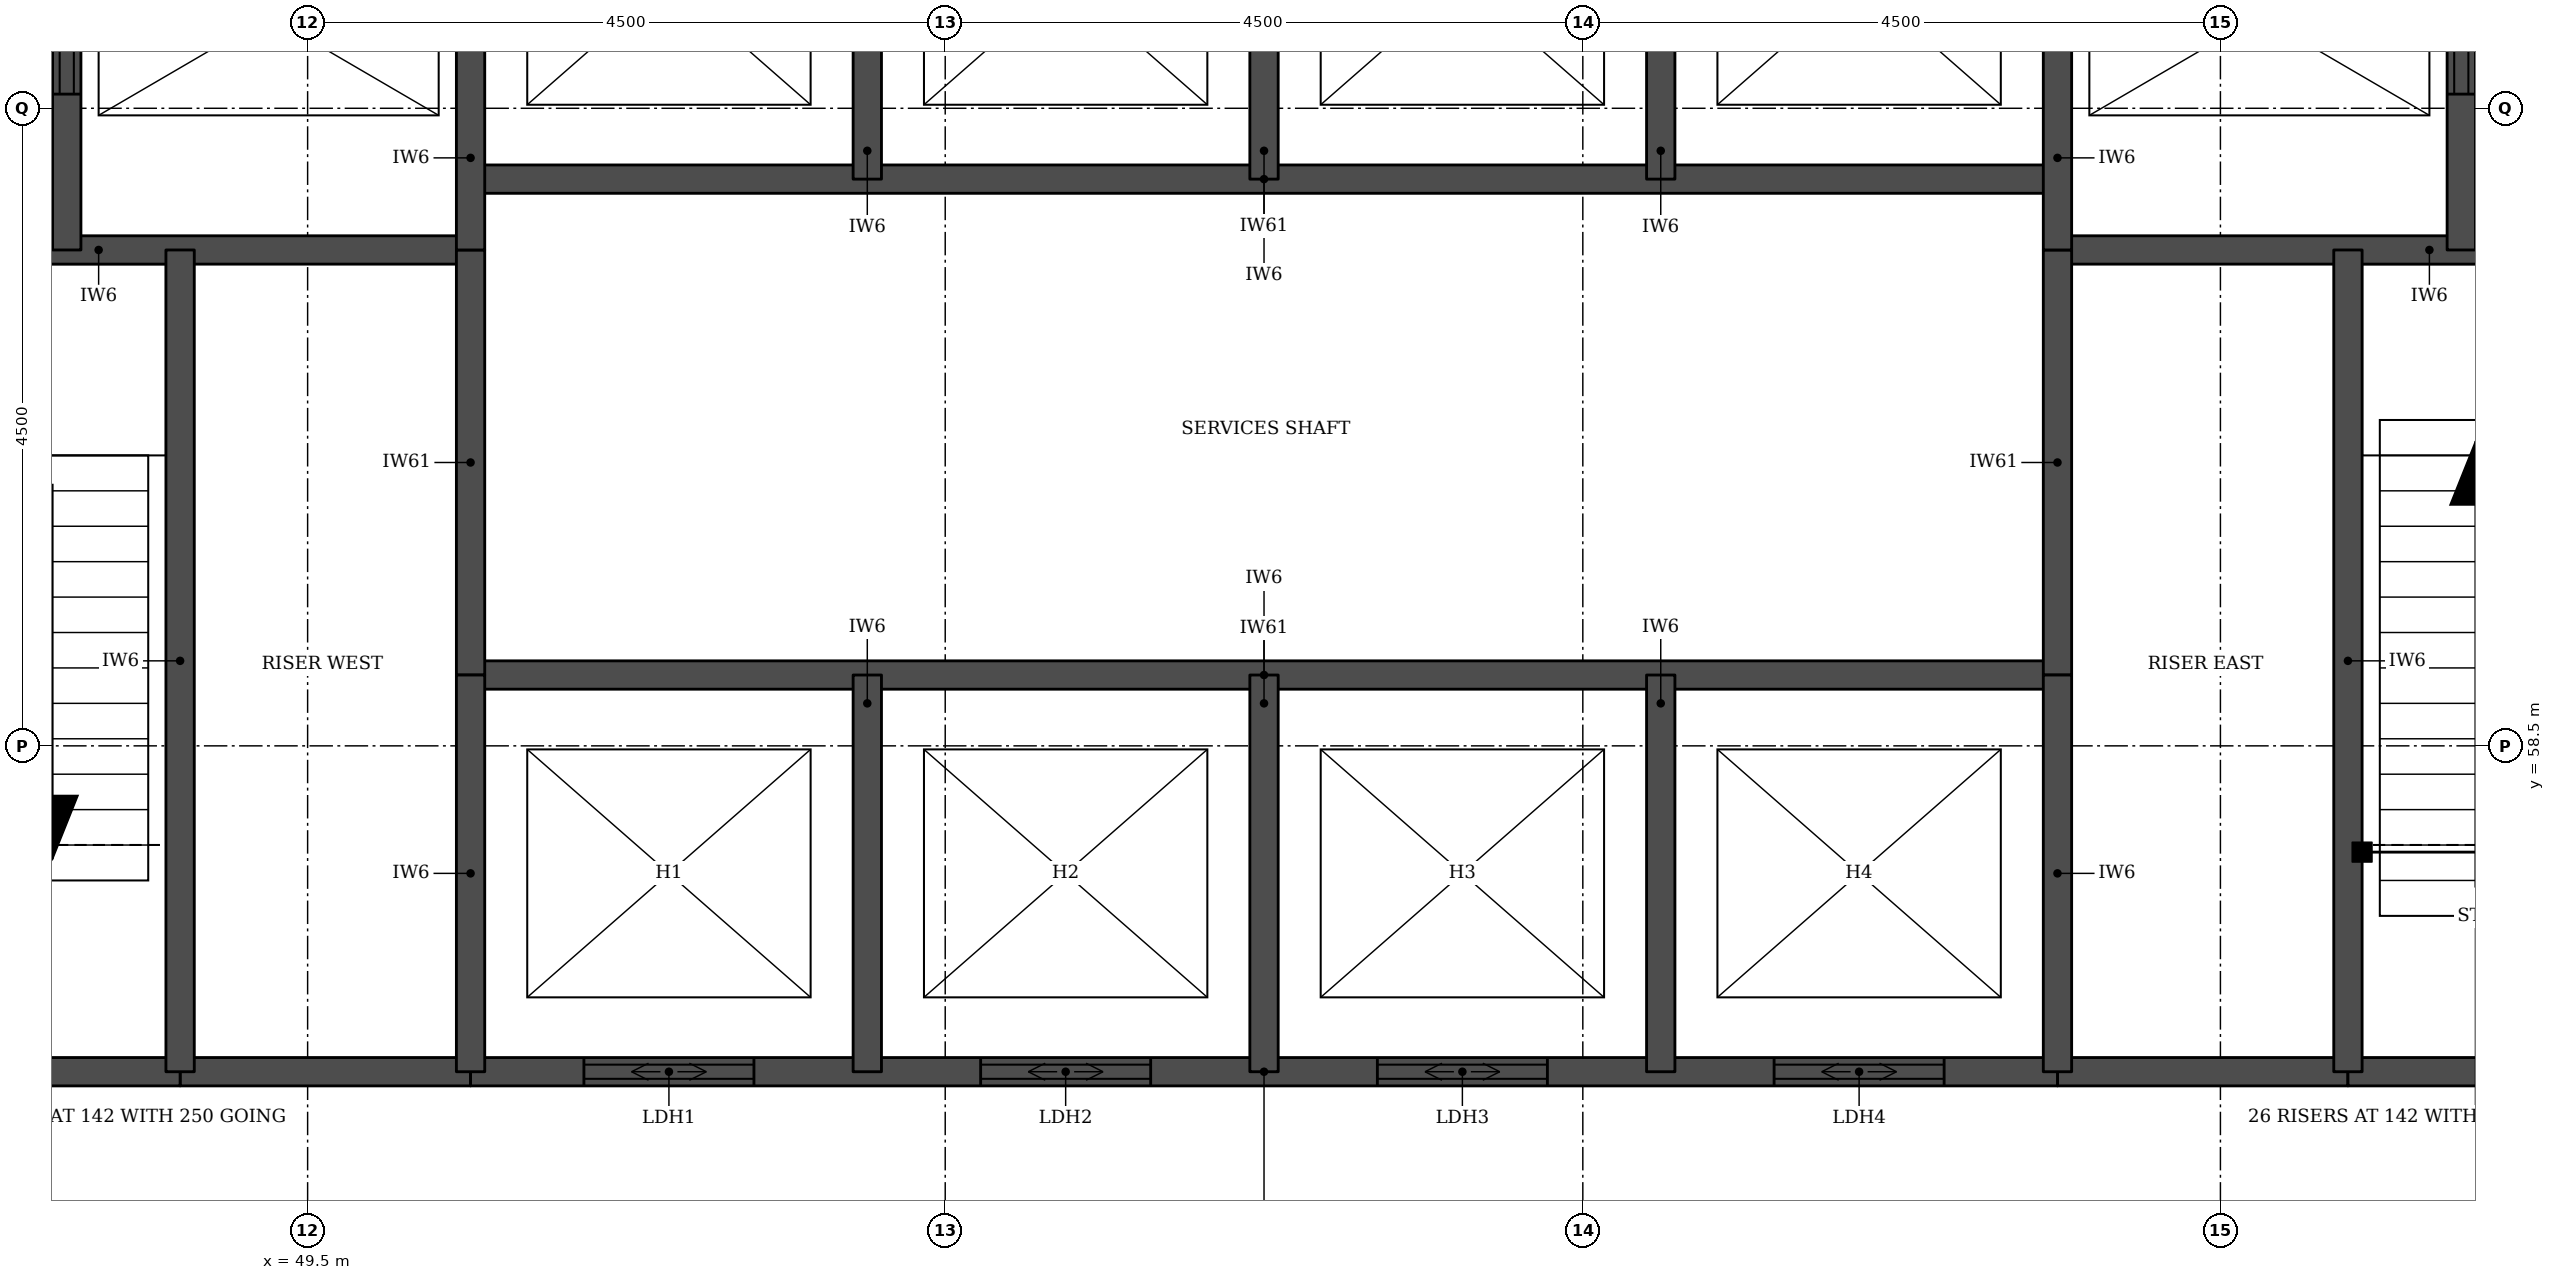
"""IFC4 building model, lengths in metres.
Left out: names, types, materials, properties, quantities, classifications, styles, units other than length and angle.
Written with IfcOpenShell. Run it as: python <this file> out.ifc"""

import sys

from ifc_helpers import new_model, si_unit, direction, frame, frame_2d, origin, place, context, subcontext, project, spatial, rectangle, extrude, element, fill, save


model = new_model("IFC4")
c1 = context("Model", 3, precision=1e-05, world=origin(), true_north=direction((0.0, 1.0)))
c2 = subcontext(c1, "Body", "Model", "MODEL_VIEW")
j1 = project(units=[si_unit("LENGTHUNIT", "METRE"), si_unit("PLANEANGLEUNIT", "RADIAN")], contexts=[c1])
p1 = place(None, origin())
s1 = spatial("IfcSite", under=j1, at=p1, CompositionType="ELEMENT")
p2 = place(p1, origin())
s2 = spatial("IfcBuilding", under=s1, at=p2, CompositionType="ELEMENT")
p3 = place(p2, frame((0.0, 0.0, 166.2)))
s3 = spatial("IfcBuildingStorey", under=s2, at=p3, CompositionType="ELEMENT", Elevation=166.2)
for number, where, z_axis, x_axis in (
    (1, (48.6, 56.2, 0.0), (0.0, 0.0, 1.0), (1.0, 0.0, 0.0)),
    (2, (61.85, 56.2, 0.0), (0.0, 0.0, 1.0), (1.0, 0.0, 0.0)),
):
    element("IfcWall", number, at=place(p3, frame(where, z_axis=z_axis, x_axis=x_axis)), inside=s3, PredefinedType="SOLIDWALL", context=c2, shape_type="SweptSolid", body=[
        extrude(rectangle(XDim=2.05, YDim=0.2, at=frame_2d((1.025, 0.0))), origin(), (0.0, 0.0, 1.0), 3.55),
    ])
p4 = place(p3, frame((45.4, 56.2, 0.0), z_axis=(0.0, 0.0, 1.0), x_axis=(1.0, 0.0, 0.0)))
e3 = element("IfcWall", 3, at=p4, inside=s3, PredefinedType="SOLIDWALL", context=c2, shape_type="SweptSolid", body=[
    extrude(rectangle(XDim=3.2, YDim=0.2, at=frame_2d((1.6, 0.0))), origin(), (0.0, 0.0, 1.0), 3.55),
])
p5 = place(p3, frame((50.65, 56.2, 0.0), z_axis=(0.0, 0.0, 1.0), x_axis=(1.0, 0.0, 0.0)))
e4 = element("IfcWall", 4, at=p5, inside=s3, PredefinedType="SOLIDWALL", context=c2, shape_type="SweptSolid", body=[
    extrude(rectangle(XDim=11.2, YDim=0.2, at=frame_2d((5.6, 0.0))), origin(), (0.0, 0.0, 1.0), 3.55),
])
p6 = place(p5, frame((0.8, 0.0, 0.0)))
e5 = element("IfcOpeningElement", 5, at=p6, cuts=e4, PredefinedType="OPENING", context=c2, shape_type="SweptSolid", body=[
    extrude(rectangle(XDim=1.2, YDim=2.1, at=frame_2d((0.6, 1.05))), frame((0.0, 0.11, 0.0), z_axis=(0.0, -1.0, 0.0), x_axis=(1.0, 0.0, 0.0)), (0.0, 0.0, 1.0), 0.22),
])
p7 = place(p5, frame((3.6, 0.0, 0.0)))
e6 = element("IfcOpeningElement", 6, at=p7, cuts=e4, PredefinedType="OPENING", context=c2, shape_type="SweptSolid", body=[
    extrude(rectangle(XDim=1.2, YDim=2.1, at=frame_2d((0.6, 1.05))), frame((0.0, 0.11, 0.0), z_axis=(0.0, -1.0, 0.0), x_axis=(1.0, 0.0, 0.0)), (0.0, 0.0, 1.0), 0.22),
])
p8 = place(p5, frame((6.4, 0.0, 0.0)))
e7 = element("IfcOpeningElement", 7, at=p8, cuts=e4, PredefinedType="OPENING", context=c2, shape_type="SweptSolid", body=[
    extrude(rectangle(XDim=1.2, YDim=2.1, at=frame_2d((0.6, 1.05))), frame((0.0, 0.11, 0.0), z_axis=(0.0, -1.0, 0.0), x_axis=(1.0, 0.0, 0.0)), (0.0, 0.0, 1.0), 0.22),
])
p9 = place(p5, frame((9.2, 0.0, 0.0)))
e8 = element("IfcOpeningElement", 8, at=p9, cuts=e4, PredefinedType="OPENING", context=c2, shape_type="SweptSolid", body=[
    extrude(rectangle(XDim=1.2, YDim=2.1, at=frame_2d((0.6, 1.05))), frame((0.0, 0.11, 0.0), z_axis=(0.0, -1.0, 0.0), x_axis=(1.0, 0.0, 0.0)), (0.0, 0.0, 1.0), 0.22),
])
p10 = place(p3, frame((63.9, 56.2, 0.0), z_axis=(0.0, 0.0, 1.0), x_axis=(1.0, 0.0, 0.0)))
e9 = element("IfcWall", 9, at=p10, inside=s3, PredefinedType="SOLIDWALL", context=c2, shape_type="SweptSolid", body=[
    extrude(rectangle(XDim=3.2, YDim=0.2, at=frame_2d((1.6, 0.0))), origin(), (0.0, 0.0, 1.0), 3.55),
])
p11 = place(p3, frame((50.65, 59.0, 0.0), z_axis=(0.0, 0.0, 1.0), x_axis=(1.0, 0.0, 0.0)))
e10 = element("IfcWall", 10, at=p11, inside=s3, PredefinedType="SOLIDWALL", context=c2, shape_type="SweptSolid", body=[
    extrude(rectangle(XDim=11.2, YDim=0.2, at=frame_2d((5.6, 0.0))), origin(), (0.0, 0.0, 1.0), 3.7),
])
for number, where, z_axis, x_axis in (
    (11, (45.4, 62.0, 0.0), (0.0, 0.0, 1.0), (1.0, 0.0, 0.0)),
    (12, (61.85, 62.0, 0.0), (0.0, 0.0, 1.0), (1.0, 0.0, 0.0)),
):
    element("IfcWall", number, at=place(p3, frame(where, z_axis=z_axis, x_axis=x_axis)), inside=s3, PredefinedType="SOLIDWALL", context=c2, shape_type="SweptSolid", body=[
        extrude(rectangle(XDim=5.25, YDim=0.2, at=frame_2d((2.625, 0.0))), origin(), (0.0, 0.0, 1.0), 3.55),
    ])
p12 = place(p3, frame((50.65, 62.5, 0.0), z_axis=(0.0, 0.0, 1.0), x_axis=(1.0, 0.0, 0.0)))
e13 = element("IfcWall", 13, at=p12, inside=s3, PredefinedType="SOLIDWALL", context=c2, shape_type="SweptSolid", body=[
    extrude(rectangle(XDim=11.2, YDim=0.2, at=frame_2d((5.6, 0.0))), origin(), (0.0, 0.0, 1.0), 3.7),
])
p13 = place(p3, frame((47.8, 62.0, 0.0), z_axis=(0.0, 0.0, 1.0), x_axis=(0.0, 1.0, 0.0)))
e14 = element("IfcWall", 14, at=p13, inside=s3, PredefinedType="SOLIDWALL", context=c2, shape_type="SweptSolid", body=[
    extrude(rectangle(XDim=3.3, YDim=0.2, at=frame_2d((1.65, 0.0))), origin(), (0.0, 0.0, 1.0), 3.55),
])
p14 = place(p13, frame((1.1, 0.0, 0.0)))
e15 = element("IfcOpeningElement", 15, at=p14, cuts=e14, PredefinedType="OPENING", context=c2, shape_type="SweptSolid", body=[
    extrude(rectangle(XDim=1.1, YDim=2.1, at=frame_2d((0.55, 1.05))), frame((0.0, 0.11, 0.0), z_axis=(0.0, -1.0, 0.0), x_axis=(1.0, 0.0, 0.0)), (0.0, 0.0, 1.0), 0.22),
])
p15 = place(p3, frame((48.6, 56.2, 0.0), z_axis=(0.0, 0.0, 1.0), x_axis=(0.0, 1.0, 0.0)))
e16 = element("IfcWall", 16, at=p15, inside=s3, PredefinedType="SOLIDWALL", context=c2, shape_type="SweptSolid", body=[
    extrude(rectangle(XDim=5.8, YDim=0.2, at=frame_2d((2.9, 0.0))), origin(), (0.0, 0.0, 1.0), 3.55),
])
p16 = place(p3, frame((50.65, 59.0, 0.0), z_axis=(0.0, 0.0, 1.0), x_axis=(0.0, 1.0, 0.0)))
e17 = element("IfcWall", 17, at=p16, inside=s3, PredefinedType="SOLIDWALL", context=c2, shape_type="SweptSolid", body=[
    extrude(rectangle(XDim=3.0, YDim=0.2, at=frame_2d((1.5, 0.0))), origin(), (0.0, 0.0, 1.0), 3.7),
])
p17 = place(p3, frame((50.65, 56.2, 0.0), z_axis=(0.0, 0.0, 1.0), x_axis=(0.0, 1.0, 0.0)))
e18 = element("IfcWall", 18, at=p17, inside=s3, PredefinedType="SOLIDWALL", context=c2, shape_type="SweptSolid", body=[
    extrude(rectangle(XDim=2.8, YDim=0.2, at=frame_2d((1.4, 0.0))), origin(), (0.0, 0.0, 1.0), 3.55),
])
p18 = place(p3, frame((50.65, 62.0, 0.0), z_axis=(0.0, 0.0, 1.0), x_axis=(0.0, 1.0, 0.0)))
e19 = element("IfcWall", 19, at=p18, inside=s3, PredefinedType="SOLIDWALL", context=c2, shape_type="SweptSolid", body=[
    extrude(rectangle(XDim=3.3, YDim=0.2, at=frame_2d((1.65, 0.0))), origin(), (0.0, 0.0, 1.0), 3.55),
])
for number, where, z_axis, x_axis in (
    (20, (53.45, 56.2, 0.0), (0.0, 0.0, 1.0), (0.0, 1.0, 0.0)),
    (21, (53.45, 62.5, 0.0), (0.0, 0.0, 1.0), (0.0, 1.0, 0.0)),
    (22, (56.25, 56.2, 0.0), (0.0, 0.0, 1.0), (0.0, 1.0, 0.0)),
    (23, (56.25, 62.5, 0.0), (0.0, 0.0, 1.0), (0.0, 1.0, 0.0)),
    (24, (59.05, 56.2, 0.0), (0.0, 0.0, 1.0), (0.0, 1.0, 0.0)),
    (25, (59.05, 62.5, 0.0), (0.0, 0.0, 1.0), (0.0, 1.0, 0.0)),
):
    element("IfcWall", number, at=place(p3, frame(where, z_axis=z_axis, x_axis=x_axis)), inside=s3, PredefinedType="SOLIDWALL", context=c2, shape_type="SweptSolid", body=[
        extrude(rectangle(XDim=2.8, YDim=0.2, at=frame_2d((1.4, 0.0))), origin(), (0.0, 0.0, 1.0), 3.55),
    ])
p19 = place(p3, frame((61.85, 59.0, 0.0), z_axis=(0.0, 0.0, 1.0), x_axis=(0.0, 1.0, 0.0)))
e26 = element("IfcWall", 26, at=p19, inside=s3, PredefinedType="SOLIDWALL", context=c2, shape_type="SweptSolid", body=[
    extrude(rectangle(XDim=3.0, YDim=0.2, at=frame_2d((1.5, 0.0))), origin(), (0.0, 0.0, 1.0), 3.7),
])
p20 = place(p3, frame((61.85, 56.2, 0.0), z_axis=(0.0, 0.0, 1.0), x_axis=(0.0, 1.0, 0.0)))
e27 = element("IfcWall", 27, at=p20, inside=s3, PredefinedType="SOLIDWALL", context=c2, shape_type="SweptSolid", body=[
    extrude(rectangle(XDim=2.8, YDim=0.2, at=frame_2d((1.4, 0.0))), origin(), (0.0, 0.0, 1.0), 3.55),
])
p21 = place(p3, frame((61.85, 62.0, 0.0), z_axis=(0.0, 0.0, 1.0), x_axis=(0.0, 1.0, 0.0)))
e28 = element("IfcWall", 28, at=p21, inside=s3, PredefinedType="SOLIDWALL", context=c2, shape_type="SweptSolid", body=[
    extrude(rectangle(XDim=3.3, YDim=0.2, at=frame_2d((1.65, 0.0))), origin(), (0.0, 0.0, 1.0), 3.55),
])
p22 = place(p3, frame((63.9, 56.2, 0.0), z_axis=(0.0, 0.0, 1.0), x_axis=(0.0, 1.0, 0.0)))
e29 = element("IfcWall", 29, at=p22, inside=s3, PredefinedType="SOLIDWALL", context=c2, shape_type="SweptSolid", body=[
    extrude(rectangle(XDim=5.8, YDim=0.2, at=frame_2d((2.9, 0.0))), origin(), (0.0, 0.0, 1.0), 3.55),
])
p23 = place(p3, frame((64.7, 62.0, 0.0), z_axis=(0.0, 0.0, 1.0), x_axis=(0.0, 1.0, 0.0)))
e30 = element("IfcWall", 30, at=p23, inside=s3, PredefinedType="SOLIDWALL", context=c2, shape_type="SweptSolid", body=[
    extrude(rectangle(XDim=3.3, YDim=0.2, at=frame_2d((1.65, 0.0))), origin(), (0.0, 0.0, 1.0), 3.55),
])
p24 = place(p23, frame((1.1, 0.0, 0.0)))
e31 = element("IfcOpeningElement", 31, at=p24, cuts=e30, PredefinedType="OPENING", context=c2, shape_type="SweptSolid", body=[
    extrude(rectangle(XDim=1.1, YDim=2.1, at=frame_2d((0.55, 1.05))), frame((0.0, 0.11, 0.0), z_axis=(0.0, -1.0, 0.0), x_axis=(1.0, 0.0, 0.0)), (0.0, 0.0, 1.0), 0.22),
])
p25 = place(p6, origin())
e32 = element("IfcDoor", 32, at=p25, inside=s3, OperationType="DOUBLE_DOOR_SLIDING", PredefinedType="DOOR", context=c2, shape_type="SweptSolid", body=[
    extrude(rectangle(XDim=1.2, YDim=2.1, at=frame_2d((0.6, 1.05))), frame((0.0, 0.025, 0.0), z_axis=(0.0, -1.0, 0.0), x_axis=(1.0, 0.0, 0.0)), (0.0, 0.0, 1.0), 0.05),
])
fill(e5, e32)
p26 = place(p7, origin())
e33 = element("IfcDoor", 33, at=p26, inside=s3, OperationType="DOUBLE_DOOR_SLIDING", PredefinedType="DOOR", context=c2, shape_type="SweptSolid", body=[
    extrude(rectangle(XDim=1.2, YDim=2.1, at=frame_2d((0.6, 1.05))), frame((0.0, 0.025, 0.0), z_axis=(0.0, -1.0, 0.0), x_axis=(1.0, 0.0, 0.0)), (0.0, 0.0, 1.0), 0.05),
])
fill(e6, e33)
p27 = place(p8, origin())
e34 = element("IfcDoor", 34, at=p27, inside=s3, OperationType="DOUBLE_DOOR_SLIDING", PredefinedType="DOOR", context=c2, shape_type="SweptSolid", body=[
    extrude(rectangle(XDim=1.2, YDim=2.1, at=frame_2d((0.6, 1.05))), frame((0.0, 0.025, 0.0), z_axis=(0.0, -1.0, 0.0), x_axis=(1.0, 0.0, 0.0)), (0.0, 0.0, 1.0), 0.05),
])
fill(e7, e34)
p28 = place(p9, origin())
e35 = element("IfcDoor", 35, at=p28, inside=s3, OperationType="DOUBLE_DOOR_SLIDING", PredefinedType="DOOR", context=c2, shape_type="SweptSolid", body=[
    extrude(rectangle(XDim=1.2, YDim=2.1, at=frame_2d((0.6, 1.05))), frame((0.0, 0.025, 0.0), z_axis=(0.0, -1.0, 0.0), x_axis=(1.0, 0.0, 0.0)), (0.0, 0.0, 1.0), 0.05),
])
fill(e8, e35)
p29 = place(p14, origin())
e36 = element("IfcDoor", 36, at=p29, inside=s3, OperationType="DOUBLE_DOOR_SLIDING", PredefinedType="DOOR", context=c2, shape_type="SweptSolid", body=[
    extrude(rectangle(XDim=1.1, YDim=2.1, at=frame_2d((0.55, 1.05))), frame((0.0, 0.025, 0.0), z_axis=(0.0, -1.0, 0.0), x_axis=(1.0, 0.0, 0.0)), (0.0, 0.0, 1.0), 0.05),
])
fill(e15, e36)
p30 = place(p24, origin())
e37 = element("IfcDoor", 37, at=p30, inside=s3, OperationType="DOUBLE_DOOR_SLIDING", PredefinedType="DOOR", context=c2, shape_type="SweptSolid", body=[
    extrude(rectangle(XDim=1.1, YDim=2.1, at=frame_2d((0.55, 1.05))), frame((0.0, 0.025, 0.0), z_axis=(0.0, -1.0, 0.0), x_axis=(1.0, 0.0, 0.0)), (0.0, 0.0, 1.0), 0.05),
])
fill(e31, e37)
save(model, sys.argv[1])
